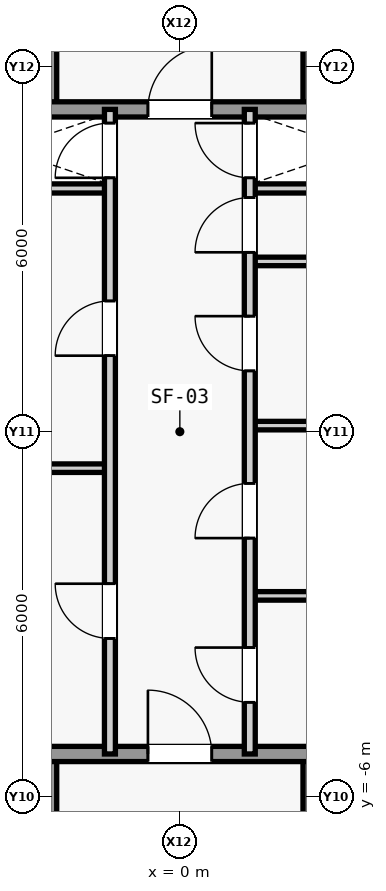
"""IFC4 building model, lengths in metres.
Left out: names, types, materials, properties, quantities, classifications, styles, units other than length and angle.
Written with IfcOpenShell. Run it as: python <this file> out.ifc"""

import sys

from ifc_helpers import new_model, si_unit, direction, frame, frame_2d, origin, place, context, subcontext, project, spatial, rectangle, extrude, source, transform, mapped, element, fill, save


model = new_model("IFC4")
c1 = context("Model", 3, precision=1e-05, world=origin(), true_north=direction((0.0, 1.0)))
c2 = subcontext(c1, "Body", "Model", "MODEL_VIEW")
j1 = project(units=[si_unit("LENGTHUNIT", "METRE"), si_unit("PLANEANGLEUNIT", "RADIAN")], contexts=[c1])
p1 = place(None, origin())
s1 = spatial("IfcSite", under=j1, at=p1, CompositionType="ELEMENT")
p2 = place(p1, origin())
s2 = spatial("IfcBuilding", under=s1, at=p2, CompositionType="ELEMENT")
p3 = place(p2, frame((0.0, 0.0, 70.4)))
s3 = spatial("IfcBuildingStorey", under=s2, at=p3, CompositionType="ELEMENT", Elevation=70.4)
m1 = source(origin(), c2, "Body", "SweptSolid", [
    extrude(rectangle(XDim=3.45, YDim=0.15, at=frame_2d((1.725, 0.0))), origin(), (0.0, 0.0, 1.0), 3.94),
])
for number, where, z_axis, x_axis in (
    (1, (-4.6, 4.0, 0.0), (0.0, 0.0, 1.0), (1.0, 0.0, 0.0)),
    (2, (1.15, 4.0, 0.0), (0.0, 0.0, 1.0), (1.0, 0.0, 0.0)),
):
    element("IfcWall", number, at=place(p3, frame(where, z_axis=z_axis, x_axis=x_axis)), inside=s3, PredefinedType="PARTITIONING", context=c2, shape_type="MappedRepresentation", body=[
        mapped(m1, transform((0.0, 0.0, 0.0), scale=1.0)),
    ])
m2 = source(origin(), c2, "Body", "SweptSolid", [
    extrude(rectangle(XDim=5.4, YDim=0.25, at=frame_2d((2.7, 0.0))), origin(), (0.0, 0.0, 1.0), 3.94),
])
p4 = place(p3, frame((-2.15, -10.7, 0.0), z_axis=(0.0, 0.0, 1.0), x_axis=(0.0, 1.0, 0.0)))
e3 = element("IfcWall", 3, at=p4, inside=s3, PredefinedType="SHEAR", context=c2, shape_type="MappedRepresentation", body=[
    mapped(m2, transform((0.0, 0.0, 0.0), scale=1.0)),
])
m3 = source(origin(), c2, "Body", "SweptSolid", [
    extrude(rectangle(XDim=1.2, YDim=2.3, at=frame_2d((0.6, 1.15))), frame((0.0, 0.135, 0.0), z_axis=(0.0, -1.0, 0.0), x_axis=(1.0, 0.0, 0.0)), (0.0, 0.0, 1.0), 0.27),
])
p5 = place(p4, frame((0.9, 0.0, 0.0)))
e4 = element("IfcOpeningElement", 4, at=p5, cuts=e3, PredefinedType="OPENING", context=c2, shape_type="MappedRepresentation", body=[
    mapped(m3, transform((0.0, 0.0, 0.0), scale=1.0)),
])
p6 = place(p4, frame((3.2, 0.0, 0.0)))
e5 = element("IfcOpeningElement", 5, at=p6, cuts=e3, PredefinedType="OPENING", context=c2, shape_type="MappedRepresentation", body=[
    mapped(m3, transform((0.0, 0.0, 0.0), scale=1.0)),
])
p7 = place(p3, frame((2.15, -10.7, 0.0), z_axis=(0.0, 0.0, 1.0), x_axis=(0.0, 1.0, 0.0)))
e6 = element("IfcWall", 6, at=p7, inside=s3, PredefinedType="SHEAR", context=c2, shape_type="MappedRepresentation", body=[
    mapped(m2, transform((0.0, 0.0, 0.0), scale=1.0)),
])
p8 = place(p7, frame((0.9, 0.0, 0.0)))
e7 = element("IfcOpeningElement", 7, at=p8, cuts=e6, PredefinedType="OPENING", context=c2, shape_type="MappedRepresentation", body=[
    mapped(m3, transform((0.0, 0.0, 0.0), scale=1.0)),
])
p9 = place(p7, frame((3.2, 0.0, 0.0)))
e8 = element("IfcOpeningElement", 8, at=p9, cuts=e6, PredefinedType="OPENING", context=c2, shape_type="MappedRepresentation", body=[
    mapped(m3, transform((0.0, 0.0, 0.0), scale=1.0)),
])
m4 = source(origin(), c2, "Body", "SweptSolid", [
    extrude(rectangle(XDim=9.2, YDim=0.25, at=frame_2d((4.6, 0.0))), origin(), (0.0, 0.0, 1.0), 3.94),
])
p10 = place(p3, frame((-4.6, -5.3, 0.0), z_axis=(0.0, 0.0, 1.0), x_axis=(1.0, 0.0, 0.0)))
e9 = element("IfcWall", 9, at=p10, inside=s3, PredefinedType="SHEAR", context=c2, shape_type="MappedRepresentation", body=[
    mapped(m4, transform((0.0, 0.0, 0.0), scale=1.0)),
])
m5 = source(origin(), c2, "Body", "SweptSolid", [
    extrude(rectangle(XDim=1.05, YDim=2.2, at=frame_2d((0.525, 1.1))), frame((0.0, 0.135, 0.0), z_axis=(0.0, -1.0, 0.0), x_axis=(1.0, 0.0, 0.0)), (0.0, 0.0, 1.0), 0.27),
])
p11 = place(p10, frame((4.075, 0.0, 0.0)))
e10 = element("IfcOpeningElement", 10, at=p11, cuts=e9, PredefinedType="OPENING", context=c2, shape_type="MappedRepresentation", body=[
    mapped(m5, transform((0.0, 0.0, 0.0), scale=1.0)),
])
for number, where, z_axis, x_axis in (
    (11, (-2.15, 5.3, 0.0), (0.0, 0.0, 1.0), (0.0, 1.0, 0.0)),
    (12, (2.15, 5.3, 0.0), (0.0, 0.0, 1.0), (0.0, 1.0, 0.0)),
):
    element("IfcWall", number, at=place(p3, frame(where, z_axis=z_axis, x_axis=x_axis)), inside=s3, PredefinedType="SHEAR", context=c2, shape_type="MappedRepresentation", body=[
        mapped(m2, transform((0.0, 0.0, 0.0), scale=1.0)),
    ])
p12 = place(p3, frame((-4.6, 5.3, 0.0), z_axis=(0.0, 0.0, 1.0), x_axis=(1.0, 0.0, 0.0)))
e13 = element("IfcWall", 13, at=p12, inside=s3, PredefinedType="SHEAR", context=c2, shape_type="MappedRepresentation", body=[
    mapped(m4, transform((0.0, 0.0, 0.0), scale=1.0)),
])
p13 = place(p12, frame((4.075, 0.0, 0.0)))
e14 = element("IfcOpeningElement", 14, at=p13, cuts=e13, PredefinedType="OPENING", context=c2, shape_type="MappedRepresentation", body=[
    mapped(m5, transform((0.0, 0.0, 0.0), scale=1.0)),
])
m6 = source(origin(), c2, "Body", "SweptSolid", [
    extrude(rectangle(XDim=3.45, YDim=0.14, at=frame_2d((1.725, 0.0))), origin(), (0.0, 0.0, 1.0), 3.94),
])
p14 = place(p3, frame((-4.6, -0.6, 0.0), z_axis=(0.0, 0.0, 1.0), x_axis=(1.0, 0.0, 0.0)))
e15 = element("IfcWall", 15, at=p14, inside=s3, PredefinedType="PARTITIONING", context=c2, shape_type="MappedRepresentation", body=[
    mapped(m6, transform((0.0, 0.0, 0.0), scale=1.0)),
])
m7 = source(origin(), c2, "Body", "SweptSolid", [
    extrude(rectangle(XDim=10.6, YDim=0.18, at=frame_2d((5.3, 0.0))), origin(), (0.0, 0.0, 1.0), 3.94),
])
p15 = place(p3, frame((-1.15, -5.3, 0.0), z_axis=(0.0, 0.0, 1.0), x_axis=(0.0, 1.0, 0.0)))
e16 = element("IfcWall", 16, at=p15, inside=s3, PredefinedType="PARTITIONING", context=c2, shape_type="MappedRepresentation", body=[
    mapped(m7, transform((0.0, 0.0, 0.0), scale=1.0)),
])
m8 = source(origin(), c2, "Body", "SweptSolid", [
    extrude(rectangle(XDim=0.9, YDim=2.15, at=frame_2d((0.45, 1.075))), frame((0.0, 0.1, 0.0), z_axis=(0.0, -1.0, 0.0), x_axis=(1.0, 0.0, 0.0)), (0.0, 0.0, 1.0), 0.2),
])
p16 = place(p15, frame((1.9, 0.0, 0.0)))
e17 = element("IfcOpeningElement", 17, at=p16, cuts=e16, PredefinedType="OPENING", context=c2, shape_type="MappedRepresentation", body=[
    mapped(m8, transform((0.0, 0.0, 0.0), scale=1.0)),
])
p17 = place(p15, frame((6.55, 0.0, 0.0)))
e18 = element("IfcOpeningElement", 18, at=p17, cuts=e16, PredefinedType="OPENING", context=c2, shape_type="MappedRepresentation", body=[
    mapped(m8, transform((0.0, 0.0, 0.0), scale=1.0)),
])
p18 = place(p15, frame((9.475, 0.0, 0.0)))
e19 = element("IfcOpeningElement", 19, at=p18, cuts=e16, PredefinedType="OPENING", context=c2, shape_type="MappedRepresentation", body=[
    mapped(m8, transform((0.0, 0.0, 0.0), scale=1.0)),
])
p19 = place(p3, frame((1.15, -2.7, 0.0), z_axis=(0.0, 0.0, 1.0), x_axis=(1.0, 0.0, 0.0)))
e20 = element("IfcWall", 20, at=p19, inside=s3, PredefinedType="PARTITIONING", context=c2, shape_type="MappedRepresentation", body=[
    mapped(m6, transform((0.0, 0.0, 0.0), scale=1.0)),
])
m9 = source(origin(), c2, "Body", "SweptSolid", [
    extrude(rectangle(XDim=3.45, YDim=0.14, at=frame_2d((1.725, 0.0))), origin(), (0.0, 0.0, 1.0), 3.245),
])
p20 = place(p3, frame((1.15, 0.1, 0.0), z_axis=(0.0, 0.0, 1.0), x_axis=(1.0, 0.0, 0.0)))
e21 = element("IfcWall", 21, at=p20, inside=s3, PredefinedType="PARTITIONING", context=c2, shape_type="MappedRepresentation", body=[
    mapped(m9, transform((0.0, 0.0, 0.0), scale=1.0)),
])
p21 = place(p3, frame((1.15, 2.8, 0.0), z_axis=(0.0, 0.0, 1.0), x_axis=(1.0, 0.0, 0.0)))
e22 = element("IfcWall", 22, at=p21, inside=s3, PredefinedType="PARTITIONING", context=c2, shape_type="MappedRepresentation", body=[
    mapped(m6, transform((0.0, 0.0, 0.0), scale=1.0)),
])
p22 = place(p3, frame((1.15, -5.3, 0.0), z_axis=(0.0, 0.0, 1.0), x_axis=(0.0, 1.0, 0.0)))
e23 = element("IfcWall", 23, at=p22, inside=s3, PredefinedType="PARTITIONING", context=c2, shape_type="MappedRepresentation", body=[
    mapped(m7, transform((0.0, 0.0, 0.0), scale=1.0)),
])
p23 = place(p22, frame((0.85, 0.0, 0.0)))
e24 = element("IfcOpeningElement", 24, at=p23, cuts=e23, PredefinedType="OPENING", context=c2, shape_type="MappedRepresentation", body=[
    mapped(m8, transform((0.0, 0.0, 0.0), scale=1.0)),
])
p24 = place(p22, frame((3.55, 0.0, 0.0)))
e25 = element("IfcOpeningElement", 25, at=p24, cuts=e23, PredefinedType="OPENING", context=c2, shape_type="MappedRepresentation", body=[
    mapped(m8, transform((0.0, 0.0, 0.0), scale=1.0)),
])
p25 = place(p22, frame((6.3, 0.0, 0.0)))
e26 = element("IfcOpeningElement", 26, at=p25, cuts=e23, PredefinedType="OPENING", context=c2, shape_type="MappedRepresentation", body=[
    mapped(m8, transform((0.0, 0.0, 0.0), scale=1.0)),
])
p26 = place(p22, frame((8.25, 0.0, 0.0)))
e27 = element("IfcOpeningElement", 27, at=p26, cuts=e23, PredefinedType="OPENING", context=c2, shape_type="MappedRepresentation", body=[
    mapped(m8, transform((0.0, 0.0, 0.0), scale=1.0)),
])
p27 = place(p22, frame((9.475, 0.0, 0.0)))
e28 = element("IfcOpeningElement", 28, at=p27, cuts=e23, PredefinedType="OPENING", context=c2, shape_type="MappedRepresentation", body=[
    mapped(m8, transform((0.0, 0.0, 0.0), scale=1.0)),
])
m10 = source(origin(), c2, "Body", "SweptSolid", [
    extrude(rectangle(XDim=1.05, YDim=2.2, at=frame_2d((0.525, 1.1))), frame((0.0, 0.025, 0.0), z_axis=(0.0, -1.0, 0.0), x_axis=(1.0, 0.0, 0.0)), (0.0, 0.0, 1.0), 0.05),
])
p28 = place(p11, origin())
e29 = element("IfcDoor", 29, at=p28, inside=s3, OperationType="SINGLE_SWING_LEFT", PredefinedType="DOOR", context=c2, shape_type="MappedRepresentation", body=[
    mapped(m10, transform((0.0, 0.0, 0.0), scale=1.0)),
])
fill(e10, e29)
p29 = place(p13, origin())
e30 = element("IfcDoor", 30, at=p29, inside=s3, OperationType="SINGLE_SWING_RIGHT", PredefinedType="DOOR", context=c2, shape_type="MappedRepresentation", body=[
    mapped(m10, transform((0.0, 0.0, 0.0), scale=1.0)),
])
fill(e14, e30)
m11 = source(origin(), c2, "Body", "SweptSolid", [
    extrude(rectangle(XDim=0.9, YDim=2.15, at=frame_2d((0.45, 1.075))), frame((0.0, 0.025, 0.0), z_axis=(0.0, -1.0, 0.0), x_axis=(1.0, 0.0, 0.0)), (0.0, 0.0, 1.0), 0.05),
])
p30 = place(p16, origin())
e31 = element("IfcDoor", 31, at=p30, inside=s3, OperationType="SINGLE_SWING_RIGHT", PredefinedType="DOOR", context=c2, shape_type="MappedRepresentation", body=[
    mapped(m11, transform((0.0, 0.0, 0.0), scale=1.0)),
])
fill(e17, e31)
p31 = place(p17, origin())
e32 = element("IfcDoor", 32, at=p31, inside=s3, OperationType="SINGLE_SWING_LEFT", PredefinedType="DOOR", context=c2, shape_type="MappedRepresentation", body=[
    mapped(m11, transform((0.0, 0.0, 0.0), scale=1.0)),
])
fill(e18, e32)
p32 = place(p23, origin())
e33 = element("IfcDoor", 33, at=p32, inside=s3, OperationType="SINGLE_SWING_RIGHT", PredefinedType="DOOR", context=c2, shape_type="MappedRepresentation", body=[
    mapped(m11, transform((0.0, 0.0, 0.0), scale=1.0)),
])
fill(e24, e33)
p33 = place(p24, origin())
e34 = element("IfcDoor", 34, at=p33, inside=s3, OperationType="SINGLE_SWING_LEFT", PredefinedType="DOOR", context=c2, shape_type="MappedRepresentation", body=[
    mapped(m11, transform((0.0, 0.0, 0.0), scale=1.0)),
])
fill(e25, e34)
p34 = place(p25, origin())
e35 = element("IfcDoor", 35, at=p34, inside=s3, OperationType="SINGLE_SWING_RIGHT", PredefinedType="DOOR", context=c2, shape_type="MappedRepresentation", body=[
    mapped(m11, transform((0.0, 0.0, 0.0), scale=1.0)),
])
fill(e26, e35)
p35 = place(p26, origin())
e36 = element("IfcDoor", 36, at=p35, inside=s3, OperationType="SINGLE_SWING_LEFT", PredefinedType="DOOR", context=c2, shape_type="MappedRepresentation", body=[
    mapped(m11, transform((0.0, 0.0, 0.0), scale=1.0)),
])
fill(e27, e36)
p36 = place(p18, origin())
e37 = element("IfcDoor", 37, at=p36, inside=s3, OperationType="SINGLE_SWING_LEFT", PredefinedType="DOOR", context=c2, shape_type="MappedRepresentation", body=[
    mapped(m11, transform((0.0, 0.0, 0.0), scale=1.0)),
])
fill(e19, e37)
p37 = place(p27, origin())
e38 = element("IfcDoor", 38, at=p37, inside=s3, OperationType="SINGLE_SWING_RIGHT", PredefinedType="DOOR", context=c2, shape_type="MappedRepresentation", body=[
    mapped(m11, transform((0.0, 0.0, 0.0), scale=1.0)),
])
fill(e28, e38)
save(model, sys.argv[1])
